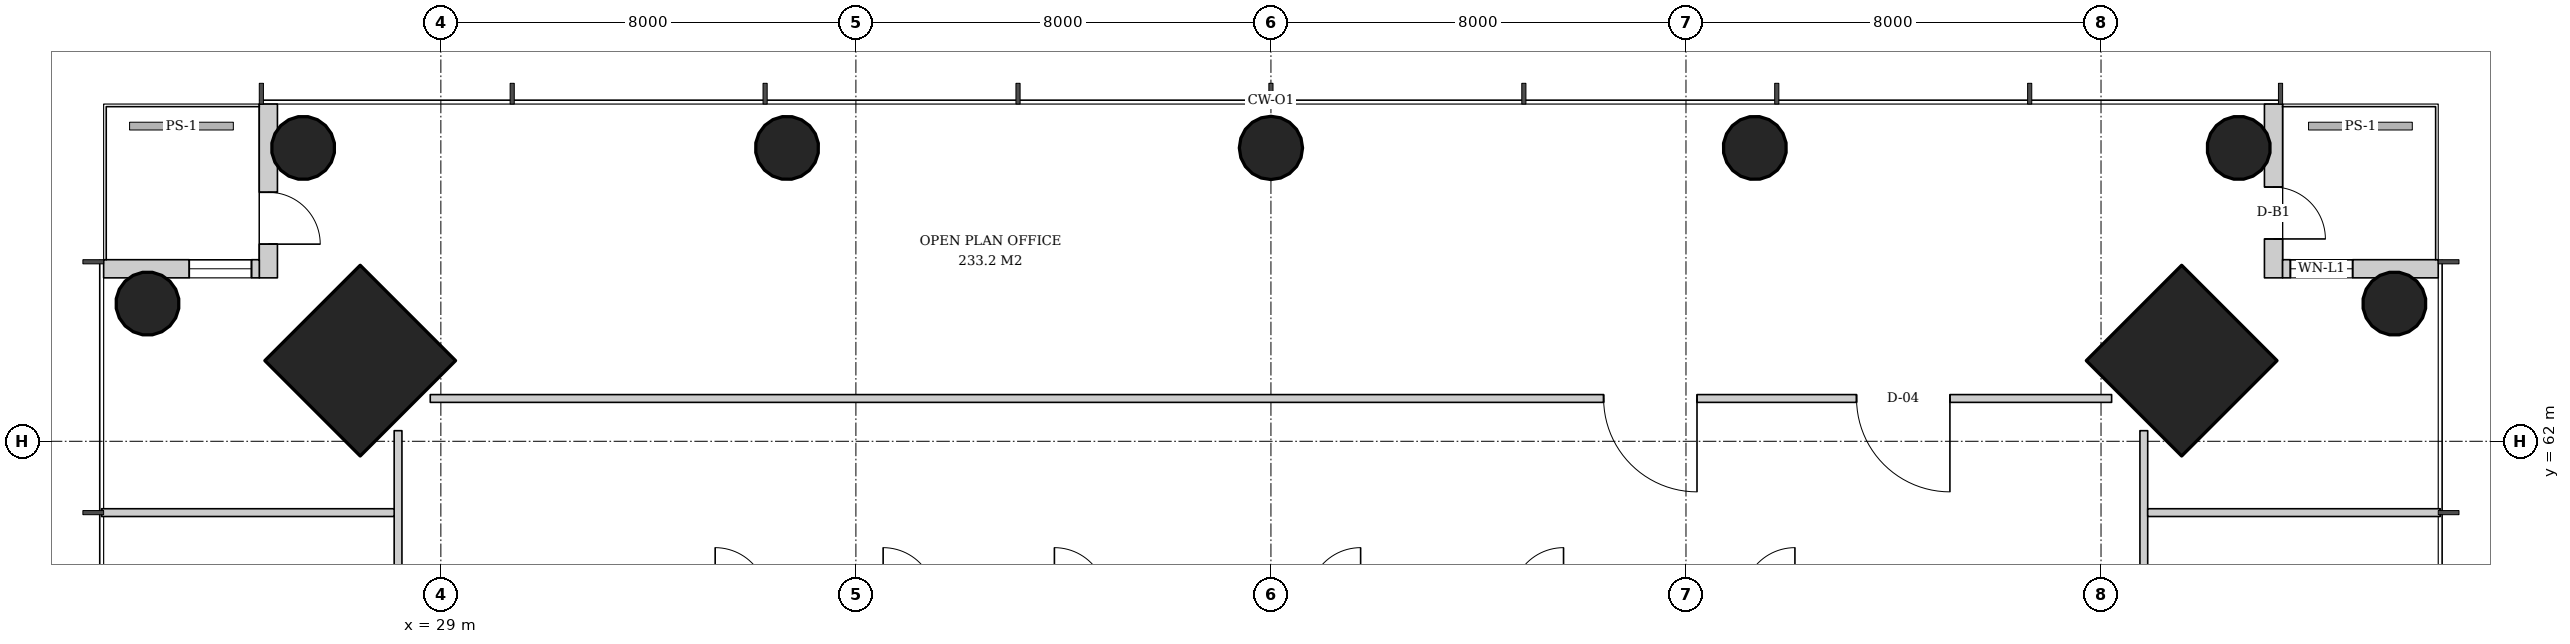
"""IFC4 building model, lengths in metres.
Left out: names, types, materials, properties, quantities, classifications, styles, units other than length and angle.
Written with IfcOpenShell. Run it as: python <this file> out.ifc"""

import sys

from ifc_helpers import new_model, si_unit, direction, frame, frame_2d, origin, origin_2d, place, context, subcontext, project, spatial, rectangle, hollow_circle, extrude, element, fill, save


model = new_model("IFC4")
c1 = context("Model", 3, precision=1e-05, world=origin(), true_north=direction((0.0, 1.0)))
c2 = subcontext(c1, "Body", "Model", "MODEL_VIEW")
j1 = project(units=[si_unit("LENGTHUNIT", "METRE"), si_unit("PLANEANGLEUNIT", "RADIAN")], contexts=[c1])
p1 = place(None, origin())
s1 = spatial("IfcSite", under=j1, at=p1, CompositionType="ELEMENT")
p2 = place(p1, origin())
s2 = spatial("IfcBuilding", under=s1, at=p2, CompositionType="ELEMENT")
p3 = place(p2, frame((0.0, 0.0, 93.2)))
s3 = spatial("IfcBuildingStorey", under=s2, at=p3, CompositionType="ELEMENT", Elevation=93.2)
p4 = place(p3, frame((62.593, 63.593, 0.0), z_axis=(-0.031898107953, -0.031898107953, 0.998981992539), x_axis=(0.707106781187, -0.707106781187, 0.0)))
e1 = element("IfcColumn", 1, at=p4, inside=s3, PredefinedType="COLUMN", context=c2, shape_type="SweptSolid", body=[
    extrude(rectangle(XDim=2.6, YDim=2.6, at=origin_2d()), origin(), (0.0, 0.0, 1.0), 3.804),
])
p5 = place(p3, frame((66.693, 64.693, 0.0), z_axis=(-0.031898107953, -0.031898107953, 0.998981992539), x_axis=(0.707106781187, -0.707106781187, 0.0)))
e2 = element("IfcColumn", 2, at=p5, inside=s3, PredefinedType="COLUMN", context=c2, shape_type="SweptSolid", body=[
    extrude(hollow_circle(Radius=0.61, WallThickness=0.04, at=origin_2d()), origin(), (0.0, 0.0, 1.0), 3.804),
])
p6 = place(p3, frame((27.407, 63.593, 0.0), z_axis=(0.031898107953, -0.031898107953, 0.998981992539), x_axis=(0.707106781187, 0.707106781187, 0.0)))
e3 = element("IfcColumn", 3, at=p6, inside=s3, PredefinedType="COLUMN", context=c2, shape_type="SweptSolid", body=[
    extrude(rectangle(XDim=2.6, YDim=2.6, at=origin_2d()), origin(), (0.0, 0.0, 1.0), 3.804),
])
for number, where, z_axis, x_axis in (
    (4, (63.693, 67.693, 0.0), (-0.032, -0.032, 0.999), (0.707, -0.707, 0.0)),
    (5, (26.307, 67.693, 0.0), (0.032, -0.032, 0.999), (0.707, 0.707, 0.0)),
):
    element("IfcColumn", number, at=place(p3, frame(where, z_axis=z_axis, x_axis=x_axis)), inside=s3, PredefinedType="COLUMN", context=c2, shape_type="SweptSolid", body=[
        extrude(hollow_circle(Radius=0.61, WallThickness=0.04, at=origin_2d()), origin(), (0.0, 0.0, 1.0), 3.804),
    ])
p7 = place(p3, frame((54.346, 67.693, 0.0), z_axis=(-0.015987237665, -0.031910269556, 0.999362868496), x_axis=(0.894067115991, -0.447933021895, 0.0)))
e6 = element("IfcColumn", 6, at=p7, inside=s3, PredefinedType="COLUMN", context=c2, shape_type="SweptSolid", body=[
    extrude(hollow_circle(Radius=0.61, WallThickness=0.04, at=origin_2d()), origin(), (0.0, 0.0, 1.0), 3.802),
])
p8 = place(p3, frame((45.0, 67.693, 0.0), z_axis=(0.0, -0.031914348339, 0.999490607445), x_axis=(1.0, 0.0, 0.0)))
e7 = element("IfcColumn", 7, at=p8, inside=s3, PredefinedType="COLUMN", context=c2, shape_type="SweptSolid", body=[
    extrude(hollow_circle(Radius=0.61, WallThickness=0.04, at=origin_2d()), origin(), (0.0, 0.0, 1.0), 3.802),
])
p9 = place(p3, frame((35.654, 67.693, 0.0), z_axis=(0.015987237665, -0.031910269556, 0.999362868496), x_axis=(0.894067115991, 0.447933021895, 0.0)))
e8 = element("IfcColumn", 8, at=p9, inside=s3, PredefinedType="COLUMN", context=c2, shape_type="SweptSolid", body=[
    extrude(hollow_circle(Radius=0.61, WallThickness=0.04, at=origin_2d()), origin(), (0.0, 0.0, 1.0), 3.802),
])
p10 = place(p3, frame((23.307, 64.693, 0.0), z_axis=(0.031898107953, -0.031898107953, 0.998981992539), x_axis=(0.707106781187, 0.707106781187, 0.0)))
e9 = element("IfcColumn", 9, at=p10, inside=s3, PredefinedType="COLUMN", context=c2, shape_type="SweptSolid", body=[
    extrude(hollow_circle(Radius=0.61, WallThickness=0.04, at=origin_2d()), origin(), (0.0, 0.0, 1.0), 3.804),
])
p11 = place(p3, frame((64.325, 68.5, 0.0), z_axis=(0.0, 0.0, 1.0), x_axis=(0.0, -1.0, 0.0)))
e10 = element("IfcWall", 10, at=p11, inside=s3, PredefinedType="SOLIDWALL", context=c2, shape_type="SweptSolid", body=[
    extrude(rectangle(XDim=3.35, YDim=0.35, at=frame_2d((1.675, 0.0))), origin(), (0.0, 0.0, 1.0), 3.62),
])
p12 = place(p11, frame((1.6, 0.0, 0.0)))
e11 = element("IfcOpeningElement", 11, at=p12, cuts=e10, PredefinedType="OPENING", context=c2, shape_type="SweptSolid", body=[
    extrude(rectangle(XDim=1.0, YDim=2.4, at=frame_2d((0.5, 1.2))), frame((0.0, 0.185, 0.0), z_axis=(0.0, -1.0, 0.0), x_axis=(1.0, 0.0, 0.0)), (0.0, 0.0, 1.0), 0.37),
])
p13 = place(p3, frame((64.5, 65.325, 0.0), z_axis=(0.0, 0.0, 1.0), x_axis=(1.0, 0.0, 0.0)))
e12 = element("IfcWall", 12, at=p13, inside=s3, PredefinedType="SOLIDWALL", context=c2, shape_type="SweptSolid", body=[
    extrude(rectangle(XDim=3.0, YDim=0.35, at=frame_2d((1.5, 0.0))), origin(), (0.0, 0.0, 1.0), 3.62),
])
p14 = place(p13, frame((0.15, 0.0, 0.6)))
e13 = element("IfcOpeningElement", 13, at=p14, cuts=e12, PredefinedType="OPENING", context=c2, shape_type="SweptSolid", body=[
    extrude(rectangle(XDim=1.2, YDim=2.55, at=frame_2d((0.6, 1.275))), frame((0.0, 0.185, 0.0), z_axis=(0.0, -1.0, 0.0), x_axis=(1.0, 0.0, 0.0)), (0.0, 0.0, 1.0), 0.37),
])
p15 = place(p3, frame((25.675, 68.5, 0.0), z_axis=(0.0, 0.0, 1.0), x_axis=(0.0, -1.0, 0.0)))
e14 = element("IfcWall", 14, at=p15, inside=s3, PredefinedType="SOLIDWALL", context=c2, shape_type="SweptSolid", body=[
    extrude(rectangle(XDim=3.35, YDim=0.35, at=frame_2d((1.675, 0.0))), origin(), (0.0, 0.0, 1.0), 3.62),
])
p16 = place(p15, frame((1.7, 0.0, 0.0)))
e15 = element("IfcOpeningElement", 15, at=p16, cuts=e14, PredefinedType="OPENING", context=c2, shape_type="SweptSolid", body=[
    extrude(rectangle(XDim=1.0, YDim=2.4, at=frame_2d((0.5, 1.2))), frame((0.0, 0.185, 0.0), z_axis=(0.0, -1.0, 0.0), x_axis=(1.0, 0.0, 0.0)), (0.0, 0.0, 1.0), 0.37),
])
p17 = place(p3, frame((25.5, 65.325, 0.0), z_axis=(0.0, 0.0, 1.0), x_axis=(-1.0, 0.0, 0.0)))
e16 = element("IfcWall", 16, at=p17, inside=s3, PredefinedType="SOLIDWALL", context=c2, shape_type="SweptSolid", body=[
    extrude(rectangle(XDim=3.0, YDim=0.35, at=frame_2d((1.5, 0.0))), origin(), (0.0, 0.0, 1.0), 3.62),
])
p18 = place(p17, frame((0.15, 0.0, 0.6)))
e17 = element("IfcOpeningElement", 17, at=p18, cuts=e16, PredefinedType="OPENING", context=c2, shape_type="SweptSolid", body=[
    extrude(rectangle(XDim=1.2, YDim=2.55, at=frame_2d((0.6, 1.275))), frame((0.0, 0.185, 0.0), z_axis=(0.0, -1.0, 0.0), x_axis=(1.0, 0.0, 0.0)), (0.0, 0.0, 1.0), 0.37),
])
p19 = place(p3, frame((61.825, 29.796, 0.0), z_axis=(0.0, 0.0, 1.0), x_axis=(0.0, 1.0, 0.0)))
e18 = element("IfcWall", 18, at=p19, inside=s3, PredefinedType="PARTITIONING", context=c2, shape_type="SweptSolid", body=[
    extrude(rectangle(XDim=32.409, YDim=0.15, at=frame_2d((16.204, 0.0))), origin(), (0.0, 0.0, 1.0), 2.72),
])
p20 = place(p19, frame((3.517, 0.0, 0.0)))
e19 = element("IfcOpeningElement", 19, at=p20, cuts=e18, PredefinedType="OPENING", context=c2, shape_type="SweptSolid", body=[
    extrude(rectangle(XDim=1.0, YDim=2.1, at=frame_2d((0.5, 1.05))), frame((0.0, 0.085, 0.0), z_axis=(0.0, -1.0, 0.0), x_axis=(1.0, 0.0, 0.0)), (0.0, 0.0, 1.0), 0.17),
])
p21 = place(p19, frame((8.392, 0.0, 0.0)))
e20 = element("IfcOpeningElement", 20, at=p21, cuts=e18, PredefinedType="OPENING", context=c2, shape_type="SweptSolid", body=[
    extrude(rectangle(XDim=1.0, YDim=2.1, at=frame_2d((0.5, 1.05))), frame((0.0, 0.085, 0.0), z_axis=(0.0, -1.0, 0.0), x_axis=(1.0, 0.0, 0.0)), (0.0, 0.0, 1.0), 0.17),
])
p22 = place(p19, frame((13.267, 0.0, 0.0)))
e21 = element("IfcOpeningElement", 21, at=p22, cuts=e18, PredefinedType="OPENING", context=c2, shape_type="SweptSolid", body=[
    extrude(rectangle(XDim=1.0, YDim=2.1, at=frame_2d((0.5, 1.05))), frame((0.0, 0.085, 0.0), z_axis=(0.0, -1.0, 0.0), x_axis=(1.0, 0.0, 0.0)), (0.0, 0.0, 1.0), 0.17),
])
p23 = place(p19, frame((18.142, 0.0, 0.0)))
e22 = element("IfcOpeningElement", 22, at=p23, cuts=e18, PredefinedType="OPENING", context=c2, shape_type="SweptSolid", body=[
    extrude(rectangle(XDim=1.0, YDim=2.1, at=frame_2d((0.5, 1.05))), frame((0.0, 0.085, 0.0), z_axis=(0.0, -1.0, 0.0), x_axis=(1.0, 0.0, 0.0)), (0.0, 0.0, 1.0), 0.17),
])
p24 = place(p19, frame((23.017, 0.0, 0.0)))
e23 = element("IfcOpeningElement", 23, at=p24, cuts=e18, PredefinedType="OPENING", context=c2, shape_type="SweptSolid", body=[
    extrude(rectangle(XDim=1.0, YDim=2.1, at=frame_2d((0.5, 1.05))), frame((0.0, 0.085, 0.0), z_axis=(0.0, -1.0, 0.0), x_axis=(1.0, 0.0, 0.0)), (0.0, 0.0, 1.0), 0.17),
])
p25 = place(p19, frame((27.892, 0.0, 0.0)))
e24 = element("IfcOpeningElement", 24, at=p25, cuts=e18, PredefinedType="OPENING", context=c2, shape_type="SweptSolid", body=[
    extrude(rectangle(XDim=1.0, YDim=2.1, at=frame_2d((0.5, 1.05))), frame((0.0, 0.085, 0.0), z_axis=(0.0, -1.0, 0.0), x_axis=(1.0, 0.0, 0.0)), (0.0, 0.0, 1.0), 0.17),
])
p26 = place(p3, frame((61.9, 60.625, 0.0), z_axis=(0.0, 0.0, 1.0), x_axis=(1.0, 0.0, 0.0)))
e25 = element("IfcWall", 25, at=p26, inside=s3, PredefinedType="PARTITIONING", context=c2, shape_type="SweptSolid", body=[
    extrude(rectangle(XDim=5.64, YDim=0.15, at=frame_2d((2.82, 0.0))), origin(), (0.0, 0.0, 1.0), 2.82),
])
p27 = place(p3, frame((61.204, 62.825, 0.0), z_axis=(0.0, 0.0, 1.0), x_axis=(-1.0, 0.0, 0.0)))
e26 = element("IfcWall", 26, at=p27, inside=s3, PredefinedType="PARTITIONING", context=c2, shape_type="SweptSolid", body=[
    extrude(rectangle(XDim=32.409, YDim=0.15, at=frame_2d((16.204, 0.0))), origin(), (0.0, 0.0, 1.0), 2.72),
])
p28 = place(p27, frame((3.117, 0.0, 0.0)))
e27 = element("IfcOpeningElement", 27, at=p28, cuts=e26, PredefinedType="OPENING", context=c2, shape_type="SweptSolid", body=[
    extrude(rectangle(XDim=1.8, YDim=2.4, at=frame_2d((0.9, 1.2))), frame((0.0, 0.085, 0.0), z_axis=(0.0, -1.0, 0.0), x_axis=(1.0, 0.0, 0.0)), (0.0, 0.0, 1.0), 0.17),
])
p29 = place(p27, frame((7.992, 0.0, 0.0)))
e28 = element("IfcOpeningElement", 28, at=p29, cuts=e26, PredefinedType="OPENING", context=c2, shape_type="SweptSolid", body=[
    extrude(rectangle(XDim=1.8, YDim=2.4, at=frame_2d((0.9, 1.2))), frame((0.0, 0.085, 0.0), z_axis=(0.0, -1.0, 0.0), x_axis=(1.0, 0.0, 0.0)), (0.0, 0.0, 1.0), 0.17),
])
p30 = place(p3, frame((28.175, 62.204, 0.0), z_axis=(0.0, 0.0, 1.0), x_axis=(0.0, -1.0, 0.0)))
e29 = element("IfcWall", 29, at=p30, inside=s3, PredefinedType="PARTITIONING", context=c2, shape_type="SweptSolid", body=[
    extrude(rectangle(XDim=32.409, YDim=0.15, at=frame_2d((16.204, 0.0))), origin(), (0.0, 0.0, 1.0), 2.72),
])
p31 = place(p30, frame((3.517, 0.0, 0.0)))
e30 = element("IfcOpeningElement", 30, at=p31, cuts=e29, PredefinedType="OPENING", context=c2, shape_type="SweptSolid", body=[
    extrude(rectangle(XDim=1.0, YDim=2.1, at=frame_2d((0.5, 1.05))), frame((0.0, 0.085, 0.0), z_axis=(0.0, -1.0, 0.0), x_axis=(1.0, 0.0, 0.0)), (0.0, 0.0, 1.0), 0.17),
])
p32 = place(p30, frame((8.392, 0.0, 0.0)))
e31 = element("IfcOpeningElement", 31, at=p32, cuts=e29, PredefinedType="OPENING", context=c2, shape_type="SweptSolid", body=[
    extrude(rectangle(XDim=1.0, YDim=2.1, at=frame_2d((0.5, 1.05))), frame((0.0, 0.085, 0.0), z_axis=(0.0, -1.0, 0.0), x_axis=(1.0, 0.0, 0.0)), (0.0, 0.0, 1.0), 0.17),
])
p33 = place(p30, frame((13.267, 0.0, 0.0)))
e32 = element("IfcOpeningElement", 32, at=p33, cuts=e29, PredefinedType="OPENING", context=c2, shape_type="SweptSolid", body=[
    extrude(rectangle(XDim=1.0, YDim=2.1, at=frame_2d((0.5, 1.05))), frame((0.0, 0.085, 0.0), z_axis=(0.0, -1.0, 0.0), x_axis=(1.0, 0.0, 0.0)), (0.0, 0.0, 1.0), 0.17),
])
p34 = place(p30, frame((18.242, 0.0, 0.0)))
e33 = element("IfcOpeningElement", 33, at=p34, cuts=e29, PredefinedType="OPENING", context=c2, shape_type="SweptSolid", body=[
    extrude(rectangle(XDim=0.8, YDim=2.1, at=frame_2d((0.4, 1.05))), frame((0.0, 0.085, 0.0), z_axis=(0.0, -1.0, 0.0), x_axis=(1.0, 0.0, 0.0)), (0.0, 0.0, 1.0), 0.17),
])
p35 = place(p30, frame((23.017, 0.0, 0.0)))
e34 = element("IfcOpeningElement", 34, at=p35, cuts=e29, PredefinedType="OPENING", context=c2, shape_type="SweptSolid", body=[
    extrude(rectangle(XDim=1.0, YDim=2.1, at=frame_2d((0.5, 1.05))), frame((0.0, 0.085, 0.0), z_axis=(0.0, -1.0, 0.0), x_axis=(1.0, 0.0, 0.0)), (0.0, 0.0, 1.0), 0.17),
])
p36 = place(p30, frame((27.992, 0.0, 0.0)))
e35 = element("IfcOpeningElement", 35, at=p36, cuts=e29, PredefinedType="OPENING", context=c2, shape_type="SweptSolid", body=[
    extrude(rectangle(XDim=0.8, YDim=2.1, at=frame_2d((0.4, 1.05))), frame((0.0, 0.085, 0.0), z_axis=(0.0, -1.0, 0.0), x_axis=(1.0, 0.0, 0.0)), (0.0, 0.0, 1.0), 0.17),
])
p37 = place(p3, frame((28.1, 60.625, 0.0), z_axis=(0.0, 0.0, 1.0), x_axis=(-1.0, 0.0, 0.0)))
e36 = element("IfcWall", 36, at=p37, inside=s3, PredefinedType="PARTITIONING", context=c2, shape_type="SweptSolid", body=[
    extrude(rectangle(XDim=5.64, YDim=0.15, at=frame_2d((2.82, 0.0))), origin(), (0.0, 0.0, 1.0), 2.82),
])
p38 = place(p12, origin())
e37 = element("IfcDoor", 37, at=p38, inside=s3, OperationType="SINGLE_SWING_RIGHT", PredefinedType="DOOR", context=c2, shape_type="SweptSolid", body=[
    extrude(rectangle(XDim=1.0, YDim=2.4, at=frame_2d((0.5, 1.2))), frame((0.0, 0.025, 0.0), z_axis=(0.0, -1.0, 0.0), x_axis=(1.0, 0.0, 0.0)), (0.0, 0.0, 1.0), 0.05),
])
fill(e11, e37)
p39 = place(p14, origin())
e38 = element("IfcWindow", 38, at=p39, inside=s3, PartitioningType="SINGLE_PANEL", PredefinedType="WINDOW", context=c2, shape_type="SweptSolid", body=[
    extrude(rectangle(XDim=1.2, YDim=2.55, at=frame_2d((0.6, 1.275))), frame((0.0, 0.03, 0.0), z_axis=(0.0, -1.0, 0.0), x_axis=(1.0, 0.0, 0.0)), (0.0, 0.0, 1.0), 0.06),
])
fill(e13, e38)
p40 = place(p16, origin())
e39 = element("IfcDoor", 39, at=p40, inside=s3, OperationType="SINGLE_SWING_RIGHT", PredefinedType="DOOR", context=c2, shape_type="SweptSolid", body=[
    extrude(rectangle(XDim=1.0, YDim=2.4, at=frame_2d((0.5, 1.2))), frame((0.0, 0.025, 0.0), z_axis=(0.0, -1.0, 0.0), x_axis=(1.0, 0.0, 0.0)), (0.0, 0.0, 1.0), 0.05),
])
fill(e15, e39)
p41 = place(p18, origin())
e40 = element("IfcWindow", 40, at=p41, inside=s3, PartitioningType="SINGLE_PANEL", PredefinedType="WINDOW", context=c2, shape_type="SweptSolid", body=[
    extrude(rectangle(XDim=1.2, YDim=2.55, at=frame_2d((0.6, 1.275))), frame((0.0, 0.03, 0.0), z_axis=(0.0, -1.0, 0.0), x_axis=(1.0, 0.0, 0.0)), (0.0, 0.0, 1.0), 0.06),
])
fill(e17, e40)
p42 = place(p28, origin())
e41 = element("IfcDoor", 41, at=p42, inside=s3, OperationType="DOUBLE_DOOR_SINGLE_SWING", PredefinedType="DOOR", context=c2, shape_type="SweptSolid", body=[
    extrude(rectangle(XDim=1.8, YDim=2.4, at=frame_2d((0.9, 1.2))), frame((0.0, 0.025, 0.0), z_axis=(0.0, -1.0, 0.0), x_axis=(1.0, 0.0, 0.0)), (0.0, 0.0, 1.0), 0.05),
])
fill(e27, e41)
p43 = place(p29, origin())
e42 = element("IfcDoor", 42, at=p43, inside=s3, OperationType="DOUBLE_DOOR_SINGLE_SWING", PredefinedType="DOOR", context=c2, shape_type="SweptSolid", body=[
    extrude(rectangle(XDim=1.8, YDim=2.4, at=frame_2d((0.9, 1.2))), frame((0.0, 0.025, 0.0), z_axis=(0.0, -1.0, 0.0), x_axis=(1.0, 0.0, 0.0)), (0.0, 0.0, 1.0), 0.05),
])
fill(e28, e42)
save(model, sys.argv[1])
